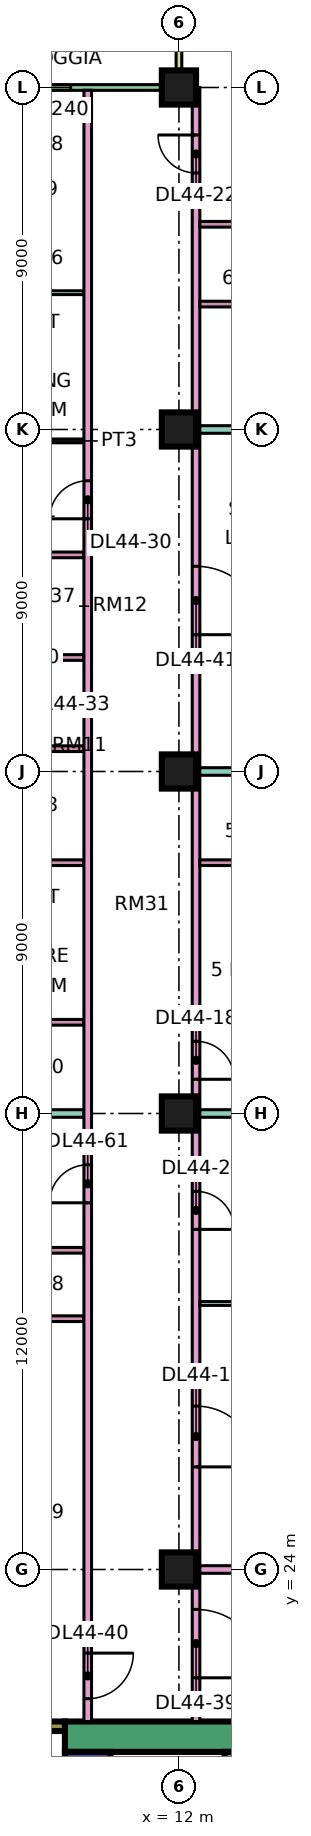
"""IFC4 building model, lengths in metres.
Left out: names, types, materials, properties, quantities, classifications, styles, units other than length and angle.
Written with IfcOpenShell. Run it as: python <this file> out.ifc"""

import sys

from ifc_helpers import new_model, si_unit, direction, frame, frame_2d, origin, origin_2d, place, context, subcontext, project, spatial, rectangle, extrude, element, fill, save


model = new_model("IFC4")
c1 = context("Model", 3, precision=1e-05, world=origin(), true_north=direction((0.0, 1.0)))
c2 = subcontext(c1, "Body", "Model", "MODEL_VIEW")
j1 = project(units=[si_unit("LENGTHUNIT", "METRE"), si_unit("PLANEANGLEUNIT", "RADIAN")], contexts=[c1])
p1 = place(None, origin())
s1 = spatial("IfcSite", under=j1, at=p1, CompositionType="ELEMENT")
p2 = place(p1, origin())
s2 = spatial("IfcBuilding", under=s1, at=p2, CompositionType="ELEMENT")
p3 = place(p2, frame((0.0, 0.0, 191.15)))
s3 = spatial("IfcBuildingStorey", under=s2, at=p3, CompositionType="ELEMENT", Elevation=191.15)
for number, where, z_axis, x_axis in (
    (1, (12.0, 24.0, 0.0), (0.0, 0.0, 1.0), (1.0, 0.0, 0.0)),
    (2, (12.0, 36.0, 0.0), (0.0, 0.0, 1.0), (1.0, 0.0, 0.0)),
    (3, (12.0, 45.0, 0.0), (0.0, 0.0, 1.0), (1.0, 0.0, 0.0)),
    (4, (12.0, 54.0, 0.0), (0.0, 0.0, 1.0), (1.0, 0.0, 0.0)),
    (5, (12.0, 63.0, 0.0), (0.0, 0.0, 1.0), (1.0, 0.0, 0.0)),
):
    element("IfcColumn", number, at=place(p3, frame(where, z_axis=z_axis, x_axis=x_axis)), inside=s3, PredefinedType="COLUMN", context=c2, shape_type="SweptSolid", body=[
        extrude(rectangle(XDim=0.9, YDim=0.9, at=origin_2d()), origin(), (0.0, 0.0, 1.0), 3.75),
    ])
p4 = place(p3, frame((9.0, 19.6, 0.0), z_axis=(0.0, 0.0, 1.0), x_axis=(1.0, 0.0, 0.0)))
e6 = element("IfcWall", 6, at=p4, inside=s3, PredefinedType="SHEAR", context=c2, shape_type="SweptSolid", body=[
    extrude(rectangle(XDim=25.0, YDim=0.8, at=frame_2d((12.5, 0.0))), origin(), (0.0, 0.0, 1.0), 3.75),
])
p5 = place(p4, frame((19.1, 0.0, 0.0)))
e7 = element("IfcOpeningElement", 7, at=p5, cuts=e6, PredefinedType="OPENING", context=c2, shape_type="SweptSolid", body=[
    extrude(rectangle(XDim=1.8, YDim=2.4, at=frame_2d((0.9, 1.2))), frame((0.0, 0.41, 0.0), z_axis=(0.0, -1.0, 0.0), x_axis=(1.0, 0.0, 0.0)), (0.0, 0.0, 1.0), 0.82),
])
p6 = place(p3, frame((9.6, 7.8, 0.0), z_axis=(0.0, 0.0, 1.0), x_axis=(0.0, 1.0, 0.0)))
e8 = element("IfcWall", 8, at=p6, inside=s3, PredefinedType="SHEAR", context=c2, shape_type="SweptSolid", body=[
    extrude(rectangle(XDim=11.4, YDim=1.2, at=frame_2d((5.7, 0.0))), origin(), (0.0, 0.0, 1.0), 3.75),
])
p7 = place(p6, frame((4.075, 0.0, 0.0)))
e9 = element("IfcOpeningElement", 9, at=p7, cuts=e8, PredefinedType="OPENING", context=c2, shape_type="SweptSolid", body=[
    extrude(rectangle(XDim=1.1, YDim=2.2, at=frame_2d((0.55, 1.1))), frame((0.0, 0.61, 0.0), z_axis=(0.0, -1.0, 0.0), x_axis=(1.0, 0.0, 0.0)), (0.0, 0.0, 1.0), 1.22),
])
p8 = place(p6, frame((6.575, 0.0, 0.0)))
e10 = element("IfcOpeningElement", 10, at=p8, cuts=e8, PredefinedType="OPENING", context=c2, shape_type="SweptSolid", body=[
    extrude(rectangle(XDim=1.1, YDim=2.2, at=frame_2d((0.55, 1.1))), frame((0.0, 0.61, 0.0), z_axis=(0.0, -1.0, 0.0), x_axis=(1.0, 0.0, 0.0)), (0.0, 0.0, 1.0), 1.22),
])
p9 = place(p6, frame((9.4, 0.0, 0.0)))
e11 = element("IfcOpeningElement", 11, at=p9, cuts=e8, PredefinedType="OPENING", context=c2, shape_type="SweptSolid", body=[
    extrude(rectangle(XDim=1.1, YDim=2.2, at=frame_2d((0.55, 1.1))), frame((0.0, 0.61, 0.0), z_axis=(0.0, -1.0, 0.0), x_axis=(1.0, 0.0, 0.0)), (0.0, 0.0, 1.0), 1.22),
])
p10 = place(p6, frame((1.75, 0.0, 0.0)))
e12 = element("IfcOpeningElement", 12, at=p10, cuts=e8, PredefinedType="OPENING", context=c2, shape_type="SweptSolid", body=[
    extrude(rectangle(XDim=0.9, YDim=2.1, at=frame_2d((0.45, 1.05))), frame((0.0, 0.61, 0.0), z_axis=(0.0, -1.0, 0.0), x_axis=(1.0, 0.0, 0.0)), (0.0, 0.0, 1.0), 1.22),
])
p11 = place(p3, frame((13.325, 7.8, 0.0), z_axis=(0.0, 0.0, 1.0), x_axis=(0.0, 1.0, 0.0)))
e13 = element("IfcWall", 13, at=p11, inside=s3, PredefinedType="SHEAR", context=c2, shape_type="SweptSolid", body=[
    extrude(rectangle(XDim=11.4, YDim=0.25, at=frame_2d((5.7, 0.0))), origin(), (0.0, 0.0, 1.0), 3.75),
])
p12 = place(p3, frame((2.1, 19.875, 0.0), z_axis=(0.0, 0.0, 1.0), x_axis=(1.0, 0.0, 0.0)))
e14 = element("IfcWall", 14, at=p12, inside=s3, PredefinedType="SHEAR", context=c2, shape_type="SweptSolid", body=[
    extrude(rectangle(XDim=6.9, YDim=0.25, at=frame_2d((3.45, 0.0))), origin(), (0.0, 0.0, 1.0), 3.75),
])
p13 = place(p12, frame((1.175, 0.0, 0.0)))
e15 = element("IfcOpeningElement", 15, at=p13, cuts=e14, PredefinedType="OPENING", context=c2, shape_type="SweptSolid", body=[
    extrude(rectangle(XDim=1.1, YDim=2.2, at=frame_2d((0.55, 1.1))), frame((0.0, 0.135, 0.0), z_axis=(0.0, -1.0, 0.0), x_axis=(1.0, 0.0, 0.0)), (0.0, 0.0, 1.0), 0.27),
])
p14 = place(p12, frame((4.6, 0.0, 0.0)))
e16 = element("IfcOpeningElement", 16, at=p14, cuts=e14, PredefinedType="OPENING", context=c2, shape_type="SweptSolid", body=[
    extrude(rectangle(XDim=1.2, YDim=2.2, at=frame_2d((0.6, 1.1))), frame((0.0, 0.135, 0.0), z_axis=(0.0, -1.0, 0.0), x_axis=(1.0, 0.0, 0.0)), (0.0, 0.0, 1.0), 0.27),
])
p15 = place(p3, frame((11.925, 63.0, 0.0), z_axis=(0.0, 0.0, 1.0), x_axis=(-1.0, 0.0, 0.0)))
e17 = element("IfcWall", 17, at=p15, inside=s3, PredefinedType="SOLIDWALL", context=c2, shape_type="SweptSolid", body=[
    extrude(rectangle(XDim=10.35, YDim=0.15, at=frame_2d((5.175, 0.0))), origin(), (0.0, 0.0, 1.0), 3.35),
])
p16 = place(p15, frame((2.775, 0.0, 0.45)))
e18 = element("IfcOpeningElement", 18, at=p16, cuts=e17, PredefinedType="OPENING", context=c2, shape_type="SweptSolid", body=[
    extrude(rectangle(XDim=1.8, YDim=2.4, at=frame_2d((0.9, 1.2))), frame((0.0, 0.085, 0.0), z_axis=(0.0, -1.0, 0.0), x_axis=(1.0, 0.0, 0.0)), (0.0, 0.0, 1.0), 0.17),
])
p17 = place(p15, frame((7.387, 0.0, 0.0)))
e19 = element("IfcOpeningElement", 19, at=p17, cuts=e17, PredefinedType="OPENING", context=c2, shape_type="SweptSolid", body=[
    extrude(rectangle(XDim=1.8, YDim=2.4, at=frame_2d((0.9, 1.2))), frame((0.0, 0.085, 0.0), z_axis=(0.0, -1.0, 0.0), x_axis=(1.0, 0.0, 0.0)), (0.0, 0.0, 1.0), 0.17),
])
p18 = place(p3, frame((12.0, 64.5, 0.0), z_axis=(0.0, 0.0, 1.0), x_axis=(0.0, -1.0, 0.0)))
e20 = element("IfcWall", 20, at=p18, inside=s3, PredefinedType="SOLIDWALL", context=c2, shape_type="SweptSolid", body=[
    extrude(rectangle(XDim=1.5, YDim=0.15, at=frame_2d((0.75, 0.0))), origin(), (0.0, 0.0, 1.0), 3.35),
])
p19 = place(p3, frame((-1.35, 22.4, 0.0), z_axis=(0.0, 0.0, 1.0), x_axis=(1.0, 0.0, 0.0)))
e21 = element("IfcWall", 21, at=p19, inside=s3, PredefinedType="PARTITIONING", context=c2, shape_type="SweptSolid", body=[
    extrude(rectangle(XDim=10.85, YDim=0.2, at=frame_2d((5.425, 0.0))), origin(), (0.0, 0.0, 1.0), 3.35),
])
p20 = place(p3, frame((0.0, 36.0, 0.0), z_axis=(0.0, 0.0, 1.0), x_axis=(1.0, 0.0, 0.0)))
e22 = element("IfcWall", 22, at=p20, inside=s3, PredefinedType="PARTITIONING", context=c2, shape_type="SweptSolid", body=[
    extrude(rectangle(XDim=9.5, YDim=0.2, at=frame_2d((4.75, 0.0))), origin(), (0.0, 0.0, 1.0), 3.35),
])
for number, where, z_axis, x_axis in (
    (23, (6.95, 53.7, 0.0), (0.0, 0.0, 1.0), (1.0, 0.0, 0.0)),
    (24, (6.95, 57.6, 0.0), (0.0, 0.0, 1.0), (1.0, 0.0, 0.0)),
):
    element("IfcWall", number, at=place(p3, frame(where, z_axis=z_axis, x_axis=x_axis)), inside=s3, PredefinedType="PARTITIONING", context=c2, shape_type="SweptSolid", body=[
        extrude(rectangle(XDim=2.55, YDim=0.1, at=frame_2d((1.275, 0.0))), origin(), (0.0, 0.0, 1.0), 3.35),
    ])
for number, where, z_axis, x_axis in (
    (25, (6.975, 30.6, 0.0), (0.0, 0.0, 1.0), (1.0, 0.0, 0.0)),
    (26, (6.975, 32.4, 0.0), (0.0, 0.0, 1.0), (1.0, 0.0, 0.0)),
    (27, (6.975, 38.4, 0.0), (0.0, 0.0, 1.0), (1.0, 0.0, 0.0)),
    (28, (6.975, 42.6, 0.0), (0.0, 0.0, 1.0), (1.0, 0.0, 0.0)),
    (29, (6.975, 45.6, 0.0), (0.0, 0.0, 1.0), (1.0, 0.0, 0.0)),
    (30, (6.975, 48.0, 0.0), (0.0, 0.0, 1.0), (1.0, 0.0, 0.0)),
):
    element("IfcWall", number, at=place(p3, frame(where, z_axis=z_axis, x_axis=x_axis)), inside=s3, PredefinedType="PARTITIONING", context=c2, shape_type="SweptSolid", body=[
        extrude(rectangle(XDim=2.525, YDim=0.15, at=frame_2d((1.262, 0.0))), origin(), (0.0, 0.0, 1.0), 3.35),
    ])
p21 = place(p3, frame((6.975, 50.7, 0.0), z_axis=(0.0, 0.0, 1.0), x_axis=(1.0, 0.0, 0.0)))
e31 = element("IfcWall", 31, at=p21, inside=s3, PredefinedType="PARTITIONING", context=c2, shape_type="SweptSolid", body=[
    extrude(rectangle(XDim=2.525, YDim=0.15, at=frame_2d((1.262, 0.0))), origin(), (0.0, 0.0, 1.0), 3.35),
])
p22 = place(p21, frame((0.825, 0.0, 0.0)))
e32 = element("IfcOpeningElement", 32, at=p22, cuts=e31, PredefinedType="OPENING", context=c2, shape_type="SweptSolid", body=[
    extrude(rectangle(XDim=0.8, YDim=2.1, at=frame_2d((0.4, 1.05))), frame((0.0, 0.085, 0.0), z_axis=(0.0, -1.0, 0.0), x_axis=(1.0, 0.0, 0.0)), (0.0, 0.0, 1.0), 0.17),
])
p23 = place(p3, frame((9.6, 20.0, 0.0), z_axis=(0.0, 0.0, 1.0), x_axis=(0.0, 1.0, 0.0)))
e33 = element("IfcWall", 33, at=p23, inside=s3, PredefinedType="PARTITIONING", context=c2, shape_type="SweptSolid", body=[
    extrude(rectangle(XDim=42.926, YDim=0.2, at=frame_2d((21.463, 0.0))), origin(), (0.0, 0.0, 1.0), 3.35),
])
p24 = place(p23, frame((31.65, 0.0, 0.0)))
e34 = element("IfcOpeningElement", 34, at=p24, cuts=e33, PredefinedType="OPENING", context=c2, shape_type="SweptSolid", body=[
    extrude(rectangle(XDim=1.0, YDim=2.1, at=frame_2d((0.5, 1.05))), frame((0.0, 0.11, 0.0), z_axis=(0.0, -1.0, 0.0), x_axis=(1.0, 0.0, 0.0)), (0.0, 0.0, 1.0), 0.22),
])
p25 = place(p23, frame((0.6, 0.0, 0.0)))
e35 = element("IfcOpeningElement", 35, at=p25, cuts=e33, PredefinedType="OPENING", context=c2, shape_type="SweptSolid", body=[
    extrude(rectangle(XDim=1.2, YDim=2.1, at=frame_2d((0.6, 1.05))), frame((0.0, 0.11, 0.0), z_axis=(0.0, -1.0, 0.0), x_axis=(1.0, 0.0, 0.0)), (0.0, 0.0, 1.0), 0.22),
])
p26 = place(p23, frame((13.65, 0.0, 0.0)))
e36 = element("IfcOpeningElement", 36, at=p26, cuts=e33, PredefinedType="OPENING", context=c2, shape_type="SweptSolid", body=[
    extrude(rectangle(XDim=1.0, YDim=2.1, at=frame_2d((0.5, 1.05))), frame((0.0, 0.11, 0.0), z_axis=(0.0, -1.0, 0.0), x_axis=(1.0, 0.0, 0.0)), (0.0, 0.0, 1.0), 0.22),
])
p27 = place(p3, frame((12.45, 20.0, 0.0), z_axis=(0.0, 0.0, 1.0), x_axis=(0.0, 1.0, 0.0)))
e37 = element("IfcWall", 37, at=p27, inside=s3, PredefinedType="PARTITIONING", context=c2, shape_type="SweptSolid", body=[
    extrude(rectangle(XDim=43.0, YDim=0.2, at=frame_2d((21.5, 0.0))), origin(), (0.0, 0.0, 1.0), 3.35),
])
p28 = place(p27, frame((6.7, 0.0, 0.0)))
e38 = element("IfcOpeningElement", 38, at=p28, cuts=e37, PredefinedType="OPENING", context=c2, shape_type="SweptSolid", body=[
    extrude(rectangle(XDim=1.6, YDim=2.1, at=frame_2d((0.8, 1.05))), frame((0.0, 0.11, 0.0), z_axis=(0.0, -1.0, 0.0), x_axis=(1.0, 0.0, 0.0)), (0.0, 0.0, 1.0), 0.22),
])
p29 = place(p27, frame((12.95, 0.0, 0.0)))
e39 = element("IfcOpeningElement", 39, at=p29, cuts=e37, PredefinedType="OPENING", context=c2, shape_type="SweptSolid", body=[
    extrude(rectangle(XDim=1.0, YDim=2.1, at=frame_2d((0.5, 1.05))), frame((0.0, 0.11, 0.0), z_axis=(0.0, -1.0, 0.0), x_axis=(1.0, 0.0, 0.0)), (0.0, 0.0, 1.0), 0.22),
])
p30 = place(p27, frame((16.9, 0.0, 0.0)))
e40 = element("IfcOpeningElement", 40, at=p30, cuts=e37, PredefinedType="OPENING", context=c2, shape_type="SweptSolid", body=[
    extrude(rectangle(XDim=1.0, YDim=2.1, at=frame_2d((0.5, 1.05))), frame((0.0, 0.11, 0.0), z_axis=(0.0, -1.0, 0.0), x_axis=(1.0, 0.0, 0.0)), (0.0, 0.0, 1.0), 0.22),
])
p31 = place(p27, frame((40.75, 0.0, 0.0)))
e41 = element("IfcOpeningElement", 41, at=p31, cuts=e37, PredefinedType="OPENING", context=c2, shape_type="SweptSolid", body=[
    extrude(rectangle(XDim=1.0, YDim=2.1, at=frame_2d((0.5, 1.05))), frame((0.0, 0.11, 0.0), z_axis=(0.0, -1.0, 0.0), x_axis=(1.0, 0.0, 0.0)), (0.0, 0.0, 1.0), 0.22),
])
p32 = place(p27, frame((1.15, 0.0, 0.0)))
e42 = element("IfcOpeningElement", 42, at=p32, cuts=e37, PredefinedType="OPENING", context=c2, shape_type="SweptSolid", body=[
    extrude(rectangle(XDim=1.8, YDim=2.1, at=frame_2d((0.9, 1.05))), frame((0.0, 0.11, 0.0), z_axis=(0.0, -1.0, 0.0), x_axis=(1.0, 0.0, 0.0)), (0.0, 0.0, 1.0), 0.22),
])
p33 = place(p27, frame((28.6, 0.0, 0.0)))
e43 = element("IfcOpeningElement", 43, at=p33, cuts=e37, PredefinedType="OPENING", context=c2, shape_type="SweptSolid", body=[
    extrude(rectangle(XDim=1.8, YDim=2.1, at=frame_2d((0.9, 1.05))), frame((0.0, 0.11, 0.0), z_axis=(0.0, -1.0, 0.0), x_axis=(1.0, 0.0, 0.0)), (0.0, 0.0, 1.0), 0.22),
])
p34 = place(p3, frame((12.55, 24.0, 0.0), z_axis=(0.0, 0.0, 1.0), x_axis=(1.0, 0.0, 0.0)))
e44 = element("IfcWall", 44, at=p34, inside=s3, PredefinedType="PARTITIONING", context=c2, shape_type="SweptSolid", body=[
    extrude(rectangle(XDim=8.95, YDim=0.2, at=frame_2d((4.475, 0.0))), origin(), (0.0, 0.0, 1.0), 3.35),
])
p35 = place(p3, frame((12.55, 31.0, 0.0), z_axis=(0.0, 0.0, 1.0), x_axis=(1.0, 0.0, 0.0)))
e45 = element("IfcWall", 45, at=p35, inside=s3, PredefinedType="PARTITIONING", context=c2, shape_type="SweptSolid", body=[
    extrude(rectangle(XDim=8.95, YDim=0.1, at=frame_2d((4.475, 0.0))), origin(), (0.0, 0.0, 1.0), 3.35),
])
p36 = place(p3, frame((12.55, 36.0, 0.0), z_axis=(0.0, 0.0, 1.0), x_axis=(1.0, 0.0, 0.0)))
e46 = element("IfcWall", 46, at=p36, inside=s3, PredefinedType="PARTITIONING", context=c2, shape_type="SweptSolid", body=[
    extrude(rectangle(XDim=11.45, YDim=0.2, at=frame_2d((5.725, 0.0))), origin(), (0.0, 0.0, 1.0), 3.35),
])
for number, where, z_axis, x_axis in (
    (47, (12.55, 38.7, 0.0), (0.0, 0.0, 1.0), (1.0, 0.0, 0.0)),
    (48, (12.55, 42.6, 0.0), (0.0, 0.0, 1.0), (1.0, 0.0, 0.0)),
):
    element("IfcWall", number, at=place(p3, frame(where, z_axis=z_axis, x_axis=x_axis)), inside=s3, PredefinedType="PARTITIONING", context=c2, shape_type="SweptSolid", body=[
        extrude(rectangle(XDim=4.025, YDim=0.15, at=frame_2d((2.012, 0.0))), origin(), (0.0, 0.0, 1.0), 3.35),
    ])
p37 = place(p3, frame((12.55, 45.0, 0.0), z_axis=(0.0, 0.0, 1.0), x_axis=(1.0, 0.0, 0.0)))
e49 = element("IfcWall", 49, at=p37, inside=s3, PredefinedType="PARTITIONING", context=c2, shape_type="SweptSolid", body=[
    extrude(rectangle(XDim=11.45, YDim=0.2, at=frame_2d((5.725, 0.0))), origin(), (0.0, 0.0, 1.0), 3.35),
])
p38 = place(p3, frame((12.55, 54.0, 0.0), z_axis=(0.0, 0.0, 1.0), x_axis=(1.0, 0.0, 0.0)))
e50 = element("IfcWall", 50, at=p38, inside=s3, PredefinedType="PARTITIONING", context=c2, shape_type="SweptSolid", body=[
    extrude(rectangle(XDim=11.376, YDim=0.2, at=frame_2d((5.688, 0.0))), origin(), (0.0, 0.0, 1.0), 3.35),
])
for number, where, z_axis, x_axis in (
    (51, (12.55, 57.3, 0.0), (0.0, 0.0, 1.0), (1.0, 0.0, 0.0)),
    (52, (12.55, 59.4, 0.0), (0.0, 0.0, 1.0), (1.0, 0.0, 0.0)),
):
    element("IfcWall", number, at=place(p3, frame(where, z_axis=z_axis, x_axis=x_axis)), inside=s3, PredefinedType="PARTITIONING", context=c2, shape_type="SweptSolid", body=[
        extrude(rectangle(XDim=4.625, YDim=0.15, at=frame_2d((2.312, 0.0))), origin(), (0.0, 0.0, 1.0), 3.35),
    ])
p39 = place(p16, origin())
e53 = element("IfcWindow", 53, at=p39, inside=s3, PartitioningType="SINGLE_PANEL", PredefinedType="WINDOW", context=c2, shape_type="SweptSolid", body=[
    extrude(rectangle(XDim=1.8, YDim=2.4, at=frame_2d((0.9, 1.2))), frame((0.0, 0.03, 0.0), z_axis=(0.0, -1.0, 0.0), x_axis=(1.0, 0.0, 0.0)), (0.0, 0.0, 1.0), 0.06),
])
fill(e18, e53)
p40 = place(p28, frame((1.6, 0.0, 0.0), z_axis=(0.0, 0.0, 1.0), x_axis=(-1.0, 0.0, 0.0)))
e54 = element("IfcDoor", 54, at=p40, inside=s3, OperationType="DOUBLE_DOOR_SINGLE_SWING", PredefinedType="DOOR", context=c2, shape_type="SweptSolid", body=[
    extrude(rectangle(XDim=1.6, YDim=2.1, at=frame_2d((0.8, 1.05))), frame((0.0, 0.025, 0.0), z_axis=(0.0, -1.0, 0.0), x_axis=(1.0, 0.0, 0.0)), (0.0, 0.0, 1.0), 0.05),
])
fill(e38, e54)
p41 = place(p29, frame((1.0, 0.0, 0.0), z_axis=(0.0, 0.0, 1.0), x_axis=(-1.0, 0.0, 0.0)))
e55 = element("IfcDoor", 55, at=p41, inside=s3, OperationType="SINGLE_SWING_LEFT", PredefinedType="DOOR", context=c2, shape_type="SweptSolid", body=[
    extrude(rectangle(XDim=1.0, YDim=2.1, at=frame_2d((0.5, 1.05))), frame((0.0, 0.025, 0.0), z_axis=(0.0, -1.0, 0.0), x_axis=(1.0, 0.0, 0.0)), (0.0, 0.0, 1.0), 0.05),
])
fill(e39, e55)
p42 = place(p30, frame((1.0, 0.0, 0.0), z_axis=(0.0, 0.0, 1.0), x_axis=(-1.0, 0.0, 0.0)))
e56 = element("IfcDoor", 56, at=p42, inside=s3, OperationType="SINGLE_SWING_LEFT", PredefinedType="DOOR", context=c2, shape_type="SweptSolid", body=[
    extrude(rectangle(XDim=1.0, YDim=2.1, at=frame_2d((0.5, 1.05))), frame((0.0, 0.025, 0.0), z_axis=(0.0, -1.0, 0.0), x_axis=(1.0, 0.0, 0.0)), (0.0, 0.0, 1.0), 0.05),
])
fill(e40, e56)
p43 = place(p31, frame((1.0, 0.0, 0.0), z_axis=(0.0, 0.0, 1.0), x_axis=(-1.0, 0.0, 0.0)))
e57 = element("IfcDoor", 57, at=p43, inside=s3, OperationType="SINGLE_SWING_RIGHT", PredefinedType="DOOR", context=c2, shape_type="SweptSolid", body=[
    extrude(rectangle(XDim=1.0, YDim=2.1, at=frame_2d((0.5, 1.05))), frame((0.0, 0.025, 0.0), z_axis=(0.0, -1.0, 0.0), x_axis=(1.0, 0.0, 0.0)), (0.0, 0.0, 1.0), 0.05),
])
fill(e41, e57)
p44 = place(p24, origin())
e58 = element("IfcDoor", 58, at=p44, inside=s3, OperationType="SINGLE_SWING_LEFT", PredefinedType="DOOR", context=c2, shape_type="SweptSolid", body=[
    extrude(rectangle(XDim=1.0, YDim=2.1, at=frame_2d((0.5, 1.05))), frame((0.0, 0.025, 0.0), z_axis=(0.0, -1.0, 0.0), x_axis=(1.0, 0.0, 0.0)), (0.0, 0.0, 1.0), 0.05),
])
fill(e34, e58)
p45 = place(p32, frame((1.8, 0.0, 0.0), z_axis=(0.0, 0.0, 1.0), x_axis=(-1.0, 0.0, 0.0)))
e59 = element("IfcDoor", 59, at=p45, inside=s3, OperationType="DOUBLE_DOOR_SINGLE_SWING", PredefinedType="DOOR", context=c2, shape_type="SweptSolid", body=[
    extrude(rectangle(XDim=1.8, YDim=2.1, at=frame_2d((0.9, 1.05))), frame((0.0, 0.025, 0.0), z_axis=(0.0, -1.0, 0.0), x_axis=(1.0, 0.0, 0.0)), (0.0, 0.0, 1.0), 0.05),
])
fill(e42, e59)
p46 = place(p25, origin())
e60 = element("IfcDoor", 60, at=p46, inside=s3, OperationType="SINGLE_SWING_RIGHT", PredefinedType="DOOR", context=c2, shape_type="SweptSolid", body=[
    extrude(rectangle(XDim=1.2, YDim=2.1, at=frame_2d((0.6, 1.05))), frame((0.0, 0.025, 0.0), z_axis=(0.0, -1.0, 0.0), x_axis=(1.0, 0.0, 0.0)), (0.0, 0.0, 1.0), 0.05),
])
fill(e35, e60)
p47 = place(p33, frame((1.8, 0.0, 0.0), z_axis=(0.0, 0.0, 1.0), x_axis=(-1.0, 0.0, 0.0)))
e61 = element("IfcDoor", 61, at=p47, inside=s3, OperationType="DOUBLE_DOOR_SINGLE_SWING", PredefinedType="DOOR", context=c2, shape_type="SweptSolid", body=[
    extrude(rectangle(XDim=1.8, YDim=2.1, at=frame_2d((0.9, 1.05))), frame((0.0, 0.025, 0.0), z_axis=(0.0, -1.0, 0.0), x_axis=(1.0, 0.0, 0.0)), (0.0, 0.0, 1.0), 0.05),
])
fill(e43, e61)
p48 = place(p26, origin())
e62 = element("IfcDoor", 62, at=p48, inside=s3, OperationType="SINGLE_SWING_LEFT", PredefinedType="DOOR", context=c2, shape_type="SweptSolid", body=[
    extrude(rectangle(XDim=1.0, YDim=2.1, at=frame_2d((0.5, 1.05))), frame((0.0, 0.025, 0.0), z_axis=(0.0, -1.0, 0.0), x_axis=(1.0, 0.0, 0.0)), (0.0, 0.0, 1.0), 0.05),
])
fill(e36, e62)
save(model, sys.argv[1])
